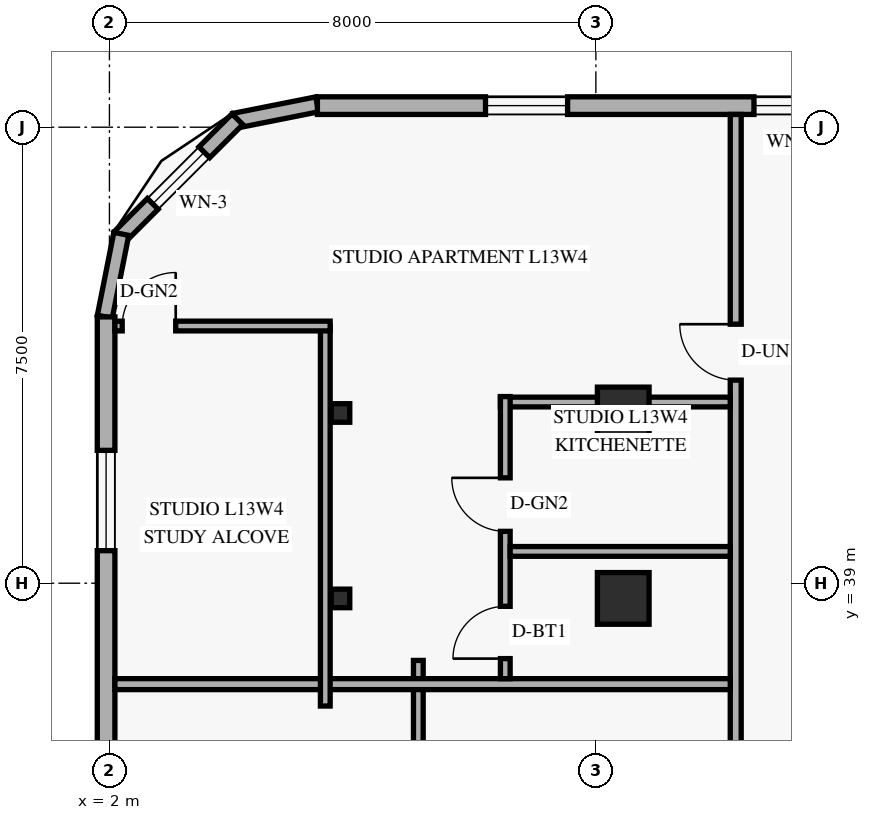
"""IFC4 building model, lengths in metres.
Left out: names, types, materials, properties, quantities, classifications, styles, units other than length and angle.
Written with IfcOpenShell. Run it as: python <this file> out.ifc"""

import sys

from ifc_helpers import new_model, si_unit, direction, frame, frame_2d, origin, origin_2d, place, context, subcontext, project, spatial, rectangle, hollow_rectangle, extrude, element, fill, save


model = new_model("IFC4")
c1 = context("Model", 3, precision=1e-05, world=origin(), true_north=direction((0.0, 1.0)))
c2 = subcontext(c1, "Body", "Model", "MODEL_VIEW")
j1 = project(units=[si_unit("LENGTHUNIT", "METRE"), si_unit("PLANEANGLEUNIT", "RADIAN")], contexts=[c1])
p1 = place(None, origin())
s1 = spatial("IfcSite", under=j1, at=p1, CompositionType="ELEMENT")
p2 = place(p1, origin())
s2 = spatial("IfcBuilding", under=s1, at=p2, CompositionType="ELEMENT")
p3 = place(p2, frame((0.0, 0.0, 52.8)))
s3 = spatial("IfcBuildingStorey", under=s2, at=p3, CompositionType="ELEMENT", Elevation=52.8)
for number, where, z_axis, x_axis in (
    (1, (5.8, 38.75, 0.0), (0.0, 0.0, 1.0), (1.0, 0.0, 0.0)),
    (2, (5.8, 41.8, 0.0), (0.0, 0.0, 1.0), (1.0, 0.0, 0.0)),
):
    element("IfcColumn", number, at=place(p3, frame(where, z_axis=z_axis, x_axis=x_axis)), inside=s3, PredefinedType="COLUMN", context=c2, shape_type="SweptSolid", body=[
        extrude(hollow_rectangle(XDim=0.305, YDim=0.305, WallThickness=0.013, at=origin_2d()), origin(), (0.0, 0.0, 1.0), 3.6),
    ])
for number, where, z_axis, x_axis in (
    (3, (10.45, 38.75, 0.0), (0.0, 0.0, 1.0), (1.0, 0.0, 0.0)),
    (4, (10.45, 41.8, 0.0), (0.0, 0.0, 1.0), (1.0, 0.0, 0.0)),
):
    element("IfcColumn", number, at=place(p3, frame(where, z_axis=z_axis, x_axis=x_axis)), inside=s3, PredefinedType="COLUMN", context=c2, shape_type="SweptSolid", body=[
        extrude(rectangle(XDim=0.85, YDim=0.85, at=origin_2d()), origin(), (0.0, 0.0, 1.0), 3.6),
    ])
p4 = place(p3, frame((5.417, 46.876, 0.0), z_axis=(0.0, 0.0, 1.0), x_axis=(-0.980809899341, -0.19496651342, 0.0)))
e5 = element("IfcWall", 5, at=p4, inside=s3, PredefinedType="SOLIDWALL", context=c2, shape_type="SweptSolid", body=[
    extrude(rectangle(XDim=1.389, YDim=0.25, at=frame_2d((0.694, 0.0))), origin(), (0.0, 0.0, 1.0), 3.36),
])
p5 = place(p3, frame((4.105, 46.632, 0.0), z_axis=(0.0, 0.0, 1.0), x_axis=(-0.707106781187, -0.707106781187, 0.0)))
e6 = element("IfcWall", 6, at=p5, inside=s3, PredefinedType="SOLIDWALL", context=c2, shape_type="SweptSolid", body=[
    extrude(rectangle(XDim=2.739, YDim=0.25, at=frame_2d((1.37, 0.0))), origin(), (0.0, 0.0, 1.0), 3.36),
])
p6 = place(p5, frame((0.77, 0.0, 0.85)))
e7 = element("IfcOpeningElement", 7, at=p6, cuts=e6, PredefinedType="OPENING", context=c2, shape_type="SweptSolid", body=[
    extrude(rectangle(XDim=1.2, YDim=1.5, at=frame_2d((0.6, 0.75))), frame((0.0, 0.135, 0.0), z_axis=(0.0, -1.0, 0.0), x_axis=(1.0, 0.0, 0.0)), (0.0, 0.0, 1.0), 0.27),
])
p7 = place(p3, frame((2.195, 44.746, 0.0), z_axis=(0.0, 0.0, 1.0), x_axis=(-0.19496651342, -0.980809899341, 0.0)))
e8 = element("IfcWall", 8, at=p7, inside=s3, PredefinedType="SOLIDWALL", context=c2, shape_type="SweptSolid", body=[
    extrude(rectangle(XDim=1.389, YDim=0.25, at=frame_2d((0.694, 0.0))), origin(), (0.0, 0.0, 1.0), 3.36),
])
p8 = place(p3, frame((44.98, 46.855, 0.0), z_axis=(0.0, 0.0, 1.0), x_axis=(-1.0, 0.0, 0.0)))
e9 = element("IfcWall", 9, at=p8, inside=s3, PredefinedType="SOLIDWALL", context=c2, shape_type="SweptSolid", body=[
    extrude(rectangle(XDim=39.56, YDim=0.29, at=frame_2d((19.78, 0.0))), origin(), (0.0, 0.0, 1.0), 3.36),
])
p9 = place(p8, frame((35.445, 0.0, 0.85)))
e10 = element("IfcOpeningElement", 10, at=p9, cuts=e9, PredefinedType="OPENING", context=c2, shape_type="SweptSolid", body=[
    extrude(rectangle(XDim=1.35, YDim=1.55, at=frame_2d((0.675, 0.775))), frame((0.0, 0.155, 0.0), z_axis=(0.0, -1.0, 0.0), x_axis=(1.0, 0.0, 0.0)), (0.0, 0.0, 1.0), 0.31),
])
p10 = place(p8, frame((31.18, 0.0, 0.85)))
e11 = element("IfcOpeningElement", 11, at=p10, cuts=e9, PredefinedType="OPENING", context=c2, shape_type="SweptSolid", body=[
    extrude(rectangle(XDim=1.2, YDim=1.5, at=frame_2d((0.6, 0.75))), frame((0.0, 0.155, 0.0), z_axis=(0.0, -1.0, 0.0), x_axis=(1.0, 0.0, 0.0)), (0.0, 0.0, 1.0), 0.31),
])
p11 = place(p8, frame((25.088, 0.0, 0.85)))
e12 = element("IfcOpeningElement", 12, at=p11, cuts=e9, PredefinedType="OPENING", context=c2, shape_type="SweptSolid", body=[
    extrude(rectangle(XDim=1.35, YDim=1.55, at=frame_2d((0.675, 0.775))), frame((0.0, 0.155, 0.0), z_axis=(0.0, -1.0, 0.0), x_axis=(1.0, 0.0, 0.0)), (0.0, 0.0, 1.0), 0.31),
])
p12 = place(p8, frame((16.498, 0.0, 0.85)))
e13 = element("IfcOpeningElement", 13, at=p12, cuts=e9, PredefinedType="OPENING", context=c2, shape_type="SweptSolid", body=[
    extrude(rectangle(XDim=1.35, YDim=1.55, at=frame_2d((0.675, 0.775))), frame((0.0, 0.155, 0.0), z_axis=(0.0, -1.0, 0.0), x_axis=(1.0, 0.0, 0.0)), (0.0, 0.0, 1.0), 0.31),
])
p13 = place(p8, frame((10.955, 0.0, 0.85)))
e14 = element("IfcOpeningElement", 14, at=p13, cuts=e9, PredefinedType="OPENING", context=c2, shape_type="SweptSolid", body=[
    extrude(rectangle(XDim=1.35, YDim=1.55, at=frame_2d((0.675, 0.775))), frame((0.0, 0.155, 0.0), z_axis=(0.0, -1.0, 0.0), x_axis=(1.0, 0.0, 0.0)), (0.0, 0.0, 1.0), 0.31),
])
p14 = place(p8, frame((7.82, 0.0, 0.85)))
e15 = element("IfcOpeningElement", 15, at=p14, cuts=e9, PredefinedType="OPENING", context=c2, shape_type="SweptSolid", body=[
    extrude(rectangle(XDim=1.35, YDim=1.55, at=frame_2d((0.675, 0.775))), frame((0.0, 0.155, 0.0), z_axis=(0.0, -1.0, 0.0), x_axis=(1.0, 0.0, 0.0)), (0.0, 0.0, 1.0), 0.31),
])
p15 = place(p8, frame((4.008, 0.0, 0.85)))
e16 = element("IfcOpeningElement", 16, at=p15, cuts=e9, PredefinedType="OPENING", context=c2, shape_type="SweptSolid", body=[
    extrude(rectangle(XDim=1.35, YDim=1.55, at=frame_2d((0.675, 0.775))), frame((0.0, 0.155, 0.0), z_axis=(0.0, -1.0, 0.0), x_axis=(1.0, 0.0, 0.0)), (0.0, 0.0, 1.0), 0.31),
])
p16 = place(p8, frame((0.292, 0.0, 0.85)))
e17 = element("IfcOpeningElement", 17, at=p16, cuts=e9, PredefinedType="OPENING", context=c2, shape_type="SweptSolid", body=[
    extrude(rectangle(XDim=1.35, YDim=1.55, at=frame_2d((0.675, 0.775))), frame((0.0, 0.155, 0.0), z_axis=(0.0, -1.0, 0.0), x_axis=(1.0, 0.0, 0.0)), (0.0, 0.0, 1.0), 0.31),
])
p17 = place(p3, frame((1.945, 43.38, 0.0), z_axis=(0.0, 0.0, 1.0), x_axis=(0.0, -1.0, 0.0)))
e18 = element("IfcWall", 18, at=p17, inside=s3, PredefinedType="SOLIDWALL", context=c2, shape_type="SweptSolid", body=[
    extrude(rectangle(XDim=38.76, YDim=0.29, at=frame_2d((19.38, 0.0))), origin(), (0.0, 0.0, 1.0), 3.36),
])
p18 = place(p17, frame((33.995, 0.0, 0.85)))
e19 = element("IfcOpeningElement", 19, at=p18, cuts=e18, PredefinedType="OPENING", context=c2, shape_type="SweptSolid", body=[
    extrude(rectangle(XDim=1.65, YDim=1.6, at=frame_2d((0.825, 0.8))), frame((0.0, 0.155, 0.0), z_axis=(0.0, -1.0, 0.0), x_axis=(1.0, 0.0, 0.0)), (0.0, 0.0, 1.0), 0.31),
])
p19 = place(p17, frame((28.81, 0.0, 0.85)))
e20 = element("IfcOpeningElement", 20, at=p19, cuts=e18, PredefinedType="OPENING", context=c2, shape_type="SweptSolid", body=[
    extrude(rectangle(XDim=1.65, YDim=1.6, at=frame_2d((0.825, 0.8))), frame((0.0, 0.155, 0.0), z_axis=(0.0, -1.0, 0.0), x_axis=(1.0, 0.0, 0.0)), (0.0, 0.0, 1.0), 0.31),
])
p20 = place(p17, frame((24.19, 0.0, 0.85)))
e21 = element("IfcOpeningElement", 21, at=p20, cuts=e18, PredefinedType="OPENING", context=c2, shape_type="SweptSolid", body=[
    extrude(rectangle(XDim=1.65, YDim=1.6, at=frame_2d((0.825, 0.8))), frame((0.0, 0.155, 0.0), z_axis=(0.0, -1.0, 0.0), x_axis=(1.0, 0.0, 0.0)), (0.0, 0.0, 1.0), 0.31),
])
p21 = place(p17, frame((18.995, 0.0, 0.85)))
e22 = element("IfcOpeningElement", 22, at=p21, cuts=e18, PredefinedType="OPENING", context=c2, shape_type="SweptSolid", body=[
    extrude(rectangle(XDim=1.65, YDim=1.6, at=frame_2d((0.825, 0.8))), frame((0.0, 0.155, 0.0), z_axis=(0.0, -1.0, 0.0), x_axis=(1.0, 0.0, 0.0)), (0.0, 0.0, 1.0), 0.31),
])
p22 = place(p17, frame((13.19, 0.0, 0.85)))
e23 = element("IfcOpeningElement", 23, at=p22, cuts=e18, PredefinedType="OPENING", context=c2, shape_type="SweptSolid", body=[
    extrude(rectangle(XDim=1.65, YDim=1.6, at=frame_2d((0.825, 0.8))), frame((0.0, 0.155, 0.0), z_axis=(0.0, -1.0, 0.0), x_axis=(1.0, 0.0, 0.0)), (0.0, 0.0, 1.0), 0.31),
])
p23 = place(p17, frame((7.21, 0.0, 0.85)))
e24 = element("IfcOpeningElement", 24, at=p23, cuts=e18, PredefinedType="OPENING", context=c2, shape_type="SweptSolid", body=[
    extrude(rectangle(XDim=1.65, YDim=1.6, at=frame_2d((0.825, 0.8))), frame((0.0, 0.155, 0.0), z_axis=(0.0, -1.0, 0.0), x_axis=(1.0, 0.0, 0.0)), (0.0, 0.0, 1.0), 0.31),
])
p24 = place(p17, frame((2.195, 0.0, 0.85)))
e25 = element("IfcOpeningElement", 25, at=p24, cuts=e18, PredefinedType="OPENING", context=c2, shape_type="SweptSolid", body=[
    extrude(rectangle(XDim=1.65, YDim=1.6, at=frame_2d((0.825, 0.8))), frame((0.0, 0.155, 0.0), z_axis=(0.0, -1.0, 0.0), x_axis=(1.0, 0.0, 0.0)), (0.0, 0.0, 1.0), 0.31),
])
p25 = place(p3, frame((12.3, 1.29, 0.0), z_axis=(0.0, 0.0, 1.0), x_axis=(0.0, 1.0, 0.0)))
e26 = element("IfcWall", 26, at=p25, inside=s3, PredefinedType="STANDARD", context=c2, shape_type="SweptSolid", body=[
    extrude(rectangle(XDim=45.42, YDim=0.18, at=frame_2d((22.71, 0.0))), origin(), (0.0, 0.0, 1.0), 2.649),
])
p26 = place(p25, frame((5.27, 0.0, 0.0)))
e27 = element("IfcOpeningElement", 27, at=p26, cuts=e26, PredefinedType="OPENING", context=c2, shape_type="SweptSolid", body=[
    extrude(rectangle(XDim=0.92, YDim=2.15, at=frame_2d((0.46, 1.075))), frame((0.0, 0.1, 0.0), z_axis=(0.0, -1.0, 0.0), x_axis=(1.0, 0.0, 0.0)), (0.0, 0.0, 1.0), 0.2),
])
p27 = place(p25, frame((14.5, 0.0, 0.0)))
e28 = element("IfcOpeningElement", 28, at=p27, cuts=e26, PredefinedType="OPENING", context=c2, shape_type="SweptSolid", body=[
    extrude(rectangle(XDim=0.92, YDim=2.15, at=frame_2d((0.46, 1.075))), frame((0.0, 0.1, 0.0), z_axis=(0.0, -1.0, 0.0), x_axis=(1.0, 0.0, 0.0)), (0.0, 0.0, 1.0), 0.2),
])
p28 = place(p25, frame((26.082, 0.0, 0.0)))
e29 = element("IfcOpeningElement", 29, at=p28, cuts=e26, PredefinedType="OPENING", context=c2, shape_type="SweptSolid", body=[
    extrude(rectangle(XDim=0.92, YDim=2.15, at=frame_2d((0.46, 1.075))), frame((0.0, 0.1, 0.0), z_axis=(0.0, -1.0, 0.0), x_axis=(1.0, 0.0, 0.0)), (0.0, 0.0, 1.0), 0.2),
])
p29 = place(p25, frame((41.05, 0.0, 0.0)))
e30 = element("IfcOpeningElement", 30, at=p29, cuts=e26, PredefinedType="OPENING", context=c2, shape_type="SweptSolid", body=[
    extrude(rectangle(XDim=0.92, YDim=2.15, at=frame_2d((0.46, 1.075))), frame((0.0, 0.1, 0.0), z_axis=(0.0, -1.0, 0.0), x_axis=(1.0, 0.0, 0.0)), (0.0, 0.0, 1.0), 0.2),
])
p30 = place(p3, frame((7.08, 33.27, 0.0), z_axis=(0.0, 0.0, 1.0), x_axis=(0.0, 1.0, 0.0)))
e31 = element("IfcWall", 31, at=p30, inside=s3, PredefinedType="PARTITIONING", context=c2, shape_type="SweptSolid", body=[
    extrude(rectangle(XDim=4.46, YDim=0.16, at=frame_2d((2.23, 0.0))), origin(), (0.0, 0.0, 1.0), 2.932),
])
p31 = place(p3, frame((2.09, 37.34, 0.0), z_axis=(0.0, 0.0, 1.0), x_axis=(1.0, 0.0, 0.0)))
e32 = element("IfcWall", 32, at=p31, inside=s3, PredefinedType="PARTITIONING", context=c2, shape_type="SweptSolid", body=[
    extrude(rectangle(XDim=10.12, YDim=0.18, at=frame_2d((5.06, 0.0))), origin(), (0.0, 0.0, 1.0), 2.649),
])
p32 = place(p3, frame((8.43, 41.98, 0.0), z_axis=(0.0, 0.0, 1.0), x_axis=(1.0, 0.0, 0.0)))
e33 = element("IfcWall", 33, at=p32, inside=s3, PredefinedType="PLUMBINGWALL", context=c2, shape_type="SweptSolid", body=[
    extrude(rectangle(XDim=3.78, YDim=0.16, at=frame_2d((1.89, 0.0))), origin(), (0.0, 0.0, 1.0), 2.809),
])
p33 = place(p3, frame((8.51, 37.43, 0.0), z_axis=(0.0, 0.0, 1.0), x_axis=(0.0, 1.0, 0.0)))
e34 = element("IfcWall", 34, at=p33, inside=s3, PredefinedType="PLUMBINGWALL", context=c2, shape_type="SweptSolid", body=[
    extrude(rectangle(XDim=4.64, YDim=0.16, at=frame_2d((2.32, 0.0))), origin(), (0.0, 0.0, 1.0), 2.649),
])
p34 = place(p33, frame((0.33, 0.0, 0.0)))
e35 = element("IfcOpeningElement", 35, at=p34, cuts=e34, PredefinedType="OPENING", context=c2, shape_type="SweptSolid", body=[
    extrude(rectangle(XDim=0.86, YDim=2.12, at=frame_2d((0.43, 1.06))), frame((0.0, 0.09, 0.0), z_axis=(0.0, -1.0, 0.0), x_axis=(1.0, 0.0, 0.0)), (0.0, 0.0, 1.0), 0.18),
])
p35 = place(p33, frame((2.423, 0.0, 0.0)))
e36 = element("IfcOpeningElement", 36, at=p35, cuts=e34, PredefinedType="OPENING", context=c2, shape_type="SweptSolid", body=[
    extrude(rectangle(XDim=0.88, YDim=2.12, at=frame_2d((0.44, 1.06))), frame((0.0, 0.09, 0.0), z_axis=(0.0, -1.0, 0.0), x_axis=(1.0, 0.0, 0.0)), (0.0, 0.0, 1.0), 0.18),
])
p36 = place(p3, frame((8.59, 39.523, 0.0), z_axis=(0.0, 0.0, 1.0), x_axis=(1.0, 0.0, 0.0)))
e37 = element("IfcWall", 37, at=p36, inside=s3, PredefinedType="PLUMBINGWALL", context=c2, shape_type="SweptSolid", body=[
    extrude(rectangle(XDim=3.62, YDim=0.16, at=frame_2d((1.81, 0.0))), origin(), (0.0, 0.0, 1.0), 2.649),
])
p37 = place(p3, frame((5.55, 36.98, 0.0), z_axis=(0.0, 0.0, 1.0), x_axis=(0.0, 1.0, 0.0)))
e38 = element("IfcWall", 38, at=p37, inside=s3, PredefinedType="PARTITIONING", context=c2, shape_type="SweptSolid", body=[
    extrude(rectangle(XDim=6.25, YDim=0.16, at=frame_2d((3.125, 0.0))), origin(), (0.0, 0.0, 1.0), 3.36),
])
p38 = place(p3, frame((2.09, 43.23, 0.0), z_axis=(0.0, 0.0, 1.0), x_axis=(1.0, 0.0, 0.0)))
e39 = element("IfcWall", 39, at=p38, inside=s3, PredefinedType="PARTITIONING", context=c2, shape_type="SweptSolid", body=[
    extrude(rectangle(XDim=3.54, YDim=0.16, at=frame_2d((1.77, 0.0))), origin(), (0.0, 0.0, 1.0), 3.36),
])
p39 = place(p38, frame((0.12, 0.0, 0.0)))
e40 = element("IfcOpeningElement", 40, at=p39, cuts=e39, PredefinedType="OPENING", context=c2, shape_type="SweptSolid", body=[
    extrude(rectangle(XDim=0.88, YDim=2.12, at=frame_2d((0.44, 1.06))), frame((0.0, 0.09, 0.0), z_axis=(0.0, -1.0, 0.0), x_axis=(1.0, 0.0, 0.0)), (0.0, 0.0, 1.0), 0.18),
])
p40 = place(p6, origin())
e41 = element("IfcWindow", 41, at=p40, inside=s3, PartitioningType="SINGLE_PANEL", PredefinedType="WINDOW", context=c2, shape_type="SweptSolid", body=[
    extrude(rectangle(XDim=1.2, YDim=1.5, at=frame_2d((0.6, 0.75))), frame((0.0, 0.03, 0.0), z_axis=(0.0, -1.0, 0.0), x_axis=(1.0, 0.0, 0.0)), (0.0, 0.0, 1.0), 0.06),
])
fill(e7, e41)
p41 = place(p9, origin())
e42 = element("IfcWindow", 42, at=p41, inside=s3, PartitioningType="SINGLE_PANEL", PredefinedType="WINDOW", context=c2, shape_type="SweptSolid", body=[
    extrude(rectangle(XDim=1.35, YDim=1.55, at=frame_2d((0.675, 0.775))), frame((0.0, 0.03, 0.0), z_axis=(0.0, -1.0, 0.0), x_axis=(1.0, 0.0, 0.0)), (0.0, 0.0, 1.0), 0.06),
])
fill(e10, e42)
p42 = place(p10, origin())
e43 = element("IfcWindow", 43, at=p42, inside=s3, PartitioningType="SINGLE_PANEL", PredefinedType="WINDOW", context=c2, shape_type="SweptSolid", body=[
    extrude(rectangle(XDim=1.2, YDim=1.5, at=frame_2d((0.6, 0.75))), frame((0.0, 0.03, 0.0), z_axis=(0.0, -1.0, 0.0), x_axis=(1.0, 0.0, 0.0)), (0.0, 0.0, 1.0), 0.06),
])
fill(e11, e43)
p43 = place(p24, origin())
e44 = element("IfcWindow", 44, at=p43, inside=s3, PartitioningType="SINGLE_PANEL", PredefinedType="WINDOW", context=c2, shape_type="SweptSolid", body=[
    extrude(rectangle(XDim=1.65, YDim=1.6, at=frame_2d((0.825, 0.8))), frame((0.0, 0.03, 0.0), z_axis=(0.0, -1.0, 0.0), x_axis=(1.0, 0.0, 0.0)), (0.0, 0.0, 1.0), 0.06),
])
fill(e25, e44)
p44 = place(p39, frame((0.88, 0.0, 0.0), z_axis=(0.0, 0.0, 1.0), x_axis=(-1.0, 0.0, 0.0)))
e45 = element("IfcDoor", 45, at=p44, inside=s3, OperationType="SINGLE_SWING_LEFT", PredefinedType="DOOR", context=c2, shape_type="SweptSolid", body=[
    extrude(rectangle(XDim=0.88, YDim=2.12, at=frame_2d((0.44, 1.06))), frame((0.0, 0.025, 0.0), z_axis=(0.0, -1.0, 0.0), x_axis=(1.0, 0.0, 0.0)), (0.0, 0.0, 1.0), 0.05),
])
fill(e40, e45)
p45 = place(p29, origin())
e46 = element("IfcDoor", 46, at=p45, inside=s3, OperationType="SINGLE_SWING_RIGHT", PredefinedType="DOOR", context=c2, shape_type="SweptSolid", body=[
    extrude(rectangle(XDim=0.92, YDim=2.15, at=frame_2d((0.46, 1.075))), frame((0.0, 0.025, 0.0), z_axis=(0.0, -1.0, 0.0), x_axis=(1.0, 0.0, 0.0)), (0.0, 0.0, 1.0), 0.05),
])
fill(e30, e46)
p46 = place(p34, origin())
e47 = element("IfcDoor", 47, at=p46, inside=s3, OperationType="SINGLE_SWING_LEFT", PredefinedType="DOOR", context=c2, shape_type="SweptSolid", body=[
    extrude(rectangle(XDim=0.86, YDim=2.12, at=frame_2d((0.43, 1.06))), frame((0.0, 0.025, 0.0), z_axis=(0.0, -1.0, 0.0), x_axis=(1.0, 0.0, 0.0)), (0.0, 0.0, 1.0), 0.05),
])
fill(e35, e47)
p47 = place(p35, origin())
e48 = element("IfcDoor", 48, at=p47, inside=s3, OperationType="SINGLE_SWING_RIGHT", PredefinedType="DOOR", context=c2, shape_type="SweptSolid", body=[
    extrude(rectangle(XDim=0.88, YDim=2.12, at=frame_2d((0.44, 1.06))), frame((0.0, 0.025, 0.0), z_axis=(0.0, -1.0, 0.0), x_axis=(1.0, 0.0, 0.0)), (0.0, 0.0, 1.0), 0.05),
])
fill(e36, e48)
save(model, sys.argv[1])
